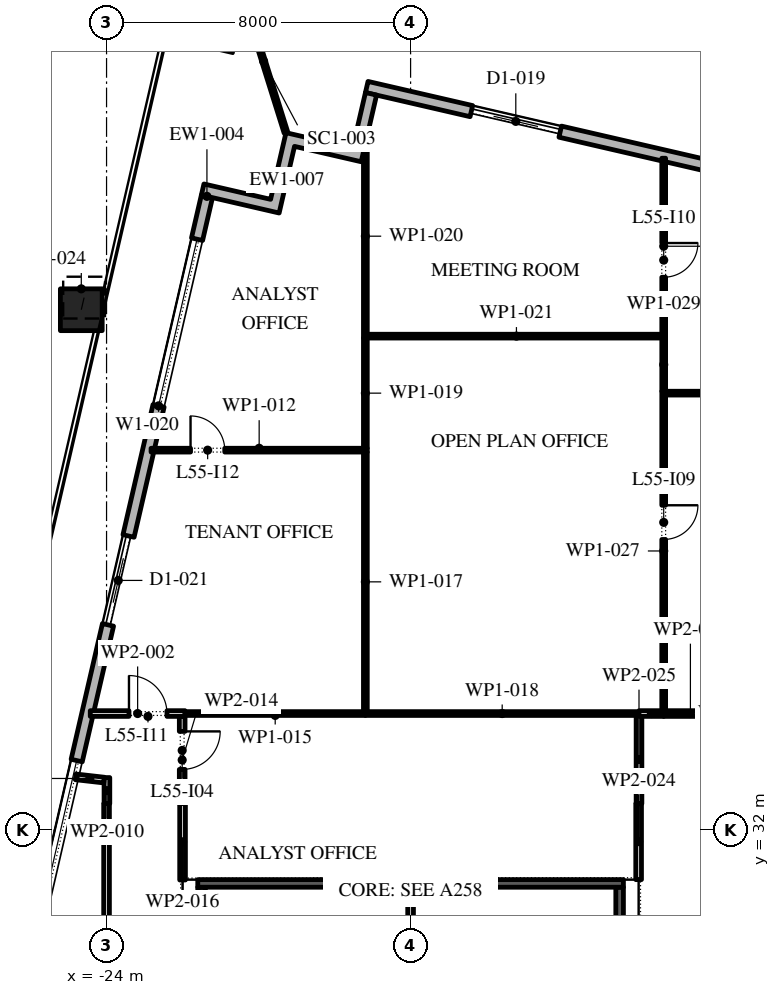
"""IFC4 building model, lengths in metres.
Left out: names, types, materials, properties, quantities, classifications, styles, units other than length and angle.
Written with IfcOpenShell. Run it as: python <this file> out.ifc"""

import sys

from ifc_helpers import new_model, si_unit, direction, frame, frame_2d, origin, origin_2d, place, context, subcontext, project, spatial, polyline, rectangle, outline, extrude, element, fill, save


model = new_model("IFC4")
c1 = context("Model", 3, precision=1e-05, world=origin(), true_north=direction((0.0, 1.0)))
c2 = subcontext(c1, "Body", "Model", "MODEL_VIEW")
j1 = project(units=[si_unit("LENGTHUNIT", "METRE"), si_unit("PLANEANGLEUNIT", "RADIAN")], contexts=[c1])
p1 = place(None, origin())
s1 = spatial("IfcSite", under=j1, at=p1, CompositionType="ELEMENT")
p2 = place(p1, origin())
s2 = spatial("IfcBuilding", under=s1, at=p2, CompositionType="ELEMENT")
p3 = place(p2, frame((0.0, 0.0, 255.6)))
s3 = spatial("IfcBuildingStorey", under=s2, at=p3, CompositionType="ELEMENT", Elevation=255.6)
p4 = place(p3, frame((-24.665, 45.695, 0.0), z_axis=(0.017501948819, 0.075745189095, 0.996973594493), x_axis=(-0.974328337224, 0.225131719848, 0.0)))
e1 = element("IfcColumn", 1, at=p4, inside=s3, PredefinedType="COLUMN", context=c2, shape_type="SweptSolid", body=[
    extrude(rectangle(XDim=1.1, YDim=1.1, at=origin_2d()), origin(), (0.0, 0.0, 1.0), 4.213),
])
p5 = place(p3, frame((29.616, 40.758, 0.0), z_axis=(0.0, 0.0, 1.0), x_axis=(-0.974370532314, 0.224949029246, 0.0)))
e2 = element("IfcWall", 2, at=p5, inside=s3, PredefinedType="STANDARD", context=c2, shape_type="SweptSolid", body=[
    extrude(rectangle(XDim=48.0, YDim=0.3, at=frame_2d((24.0, 0.0))), origin(), (0.0, 0.0, 1.0), 4.0),
])
p6 = place(p5, frame((1.625, 0.0, 0.45)))
e3 = element("IfcOpeningElement", 3, at=p6, cuts=e2, PredefinedType="OPENING", context=c2, shape_type="SweptSolid", body=[
    extrude(rectangle(XDim=4.5, YDim=2.675, at=frame_2d((2.25, 1.337))), frame((0.0, 0.16, 0.0), z_axis=(0.0, -1.0, 0.0), x_axis=(1.0, 0.0, 0.0)), (0.0, 0.0, 1.0), 0.32),
])
p7 = place(p5, frame((10.575, 0.0, 0.0)))
e4 = element("IfcOpeningElement", 4, at=p7, cuts=e2, PredefinedType="OPENING", context=c2, shape_type="SweptSolid", body=[
    extrude(rectangle(XDim=2.4, YDim=3.5, at=frame_2d((1.2, 1.75))), frame((0.0, 0.16, 0.0), z_axis=(0.0, -1.0, 0.0), x_axis=(1.0, 0.0, 0.0)), (0.0, 0.0, 1.0), 0.32),
])
p8 = place(p5, frame((17.575, 0.0, 0.45)))
e5 = element("IfcOpeningElement", 5, at=p8, cuts=e2, PredefinedType="OPENING", context=c2, shape_type="SweptSolid", body=[
    extrude(rectangle(XDim=4.5, YDim=2.525, at=frame_2d((2.25, 1.262))), frame((0.0, 0.16, 0.0), z_axis=(0.0, -1.0, 0.0), x_axis=(1.0, 0.0, 0.0)), (0.0, 0.0, 1.0), 0.32),
])
p9 = place(p5, frame((25.625, 0.0, 0.45)))
e6 = element("IfcOpeningElement", 6, at=p9, cuts=e2, PredefinedType="OPENING", context=c2, shape_type="SweptSolid", body=[
    extrude(rectangle(XDim=4.5, YDim=2.45, at=frame_2d((2.25, 1.225))), frame((0.0, 0.16, 0.0), z_axis=(0.0, -1.0, 0.0), x_axis=(1.0, 0.0, 0.0)), (0.0, 0.0, 1.0), 0.32),
])
p10 = place(p5, frame((33.675, 0.0, 0.45)))
e7 = element("IfcOpeningElement", 7, at=p10, cuts=e2, PredefinedType="OPENING", context=c2, shape_type="SweptSolid", body=[
    extrude(rectangle(XDim=4.5, YDim=2.45, at=frame_2d((2.25, 1.225))), frame((0.0, 0.16, 0.0), z_axis=(0.0, -1.0, 0.0), x_axis=(1.0, 0.0, 0.0)), (0.0, 0.0, 1.0), 0.32),
])
p11 = place(p5, frame((42.775, 0.0, 0.0)))
e8 = element("IfcOpeningElement", 8, at=p11, cuts=e2, PredefinedType="OPENING", context=c2, shape_type="SweptSolid", body=[
    extrude(rectangle(XDim=2.4, YDim=3.5, at=frame_2d((1.2, 1.75))), frame((0.0, 0.16, 0.0), z_axis=(0.0, -1.0, 0.0), x_axis=(1.0, 0.0, 0.0)), (0.0, 0.0, 1.0), 0.32),
])
p12 = place(p3, frame((-21.359, 48.678, 0.0), z_axis=(0.0, 0.0, 1.0), x_axis=(-0.224949198343, -0.974370493275, 0.0)))
e9 = element("IfcWall", 9, at=p12, inside=s3, PredefinedType="STANDARD", context=c2, shape_type="SweptSolid", body=[
    extrude(rectangle(XDim=49.5, YDim=0.3, at=frame_2d((24.75, 0.0))), origin(), (0.0, 0.0, 1.0), 4.0),
])
p13 = place(p12, frame((1.157, 0.0, 0.45)))
e10 = element("IfcOpeningElement", 10, at=p13, cuts=e9, PredefinedType="OPENING", context=c2, shape_type="SweptSolid", body=[
    extrude(rectangle(XDim=4.5, YDim=3.05, at=frame_2d((2.25, 1.525))), frame((0.0, 0.16, 0.0), z_axis=(0.0, -1.0, 0.0), x_axis=(1.0, 0.0, 0.0)), (0.0, 0.0, 1.0), 0.32),
])
p14 = place(p12, frame((9.171, 0.0, 0.0)))
e11 = element("IfcOpeningElement", 11, at=p14, cuts=e9, PredefinedType="OPENING", context=c2, shape_type="SweptSolid", body=[
    extrude(rectangle(XDim=2.4, YDim=3.5, at=frame_2d((1.2, 1.75))), frame((0.0, 0.16, 0.0), z_axis=(0.0, -1.0, 0.0), x_axis=(1.0, 0.0, 0.0)), (0.0, 0.0, 1.0), 0.32),
])
p15 = place(p12, frame((15.236, 0.0, 0.45)))
e12 = element("IfcOpeningElement", 12, at=p15, cuts=e9, PredefinedType="OPENING", context=c2, shape_type="SweptSolid", body=[
    extrude(rectangle(XDim=4.5, YDim=3.05, at=frame_2d((2.25, 1.525))), frame((0.0, 0.16, 0.0), z_axis=(0.0, -1.0, 0.0), x_axis=(1.0, 0.0, 0.0)), (0.0, 0.0, 1.0), 0.32),
])
p16 = place(p12, frame((22.35, 0.0, 0.45)))
e13 = element("IfcOpeningElement", 13, at=p16, cuts=e9, PredefinedType="OPENING", context=c2, shape_type="SweptSolid", body=[
    extrude(rectangle(XDim=4.5, YDim=3.05, at=frame_2d((2.25, 1.525))), frame((0.0, 0.16, 0.0), z_axis=(0.0, -1.0, 0.0), x_axis=(1.0, 0.0, 0.0)), (0.0, 0.0, 1.0), 0.32),
])
p17 = place(p12, frame((29.464, 0.0, 0.45)))
e14 = element("IfcOpeningElement", 14, at=p17, cuts=e9, PredefinedType="OPENING", context=c2, shape_type="SweptSolid", body=[
    extrude(rectangle(XDim=4.5, YDim=3.05, at=frame_2d((2.25, 1.525))), frame((0.0, 0.16, 0.0), z_axis=(0.0, -1.0, 0.0), x_axis=(1.0, 0.0, 0.0)), (0.0, 0.0, 1.0), 0.32),
])
p18 = place(p12, frame((37.628, 0.0, 0.0)))
e15 = element("IfcOpeningElement", 15, at=p18, cuts=e9, PredefinedType="OPENING", context=c2, shape_type="SweptSolid", body=[
    extrude(rectangle(XDim=2.4, YDim=3.325, at=frame_2d((1.2, 1.663))), frame((0.0, 0.16, 0.0), z_axis=(0.0, -1.0, 0.0), x_axis=(1.0, 0.0, 0.0)), (0.0, 0.0, 1.0), 0.32),
])
p19 = place(p12, frame((43.693, 0.0, 0.45)))
e16 = element("IfcOpeningElement", 16, at=p19, cuts=e9, PredefinedType="OPENING", context=c2, shape_type="SweptSolid", body=[
    extrude(rectangle(XDim=4.5, YDim=2.825, at=frame_2d((2.25, 1.413))), frame((0.0, 0.16, 0.0), z_axis=(0.0, -1.0, 0.0), x_axis=(1.0, 0.0, 0.0)), (0.0, 0.0, 1.0), 0.32),
])
p20 = place(p3, origin())
e17 = element("IfcWall", 17, at=p20, inside=s3, PredefinedType="STANDARD", context=c2, shape_type="SweptSolid", body=[
    extrude(outline(polyline([(-21.505, 48.712), (-21.438, 49.004), (-19.684, 48.599), (-19.279, 50.353), (-17.525, 49.948), (-17.188, 51.41), (-16.895, 51.342), (-17.3, 49.588), (-19.054, 49.993), (-19.459, 48.24), (-21.505, 48.712)])), origin(), (0.0, 0.0, 1.0), 4.0),
])
p21 = place(p3, frame((-19.279, 50.353, -0.05), z_axis=(0.0, 0.0, 1.0), x_axis=(-0.299021910401, 0.954246245526, 0.0)))
e18 = element("IfcWall", 18, at=p21, inside=s3, PredefinedType="STANDARD", context=c2, shape_type="SweptSolid", body=[
    extrude(rectangle(XDim=3.945, YDim=0.1, at=frame_2d((1.973, 0.0))), origin(), (0.0, 0.0, 1.0), 4.05),
])
p22 = place(p3, frame((-21.5, 25.75, 0.0), z_axis=(0.0, 0.0, 1.0), x_axis=(0.0, 1.0, 0.0)))
e19 = element("IfcWall", 19, at=p22, inside=s3, PredefinedType="SHEAR", context=c2, shape_type="SweptSolid", body=[
    extrude(rectangle(XDim=4.75, YDim=0.2, at=frame_2d((2.375, 0.0))), origin(), (0.0, 0.0, 1.0), 4.0),
])
p23 = place(p22, frame((1.925, 0.0, 0.0)))
e20 = element("IfcOpeningElement", 20, at=p23, cuts=e19, PredefinedType="OPENING", context=c2, shape_type="SweptSolid", body=[
    extrude(rectangle(XDim=0.9, YDim=2.1, at=frame_2d((0.45, 1.05))), frame((0.0, 0.11, 0.0), z_axis=(0.0, -1.0, 0.0), x_axis=(1.0, 0.0, 0.0)), (0.0, 0.0, 1.0), 0.22),
])
p24 = place(p3, frame((-10.5, 25.75, 0.0), z_axis=(0.0, 0.0, 1.0), x_axis=(0.0, 1.0, 0.0)))
e21 = element("IfcWall", 21, at=p24, inside=s3, PredefinedType="SHEAR", context=c2, shape_type="SweptSolid", body=[
    extrude(rectangle(XDim=4.75, YDim=0.2, at=frame_2d((2.375, 0.0))), origin(), (0.0, 0.0, 1.0), 4.0),
])
p25 = place(p24, frame((1.925, 0.0, 0.0)))
e22 = element("IfcOpeningElement", 22, at=p25, cuts=e21, PredefinedType="OPENING", context=c2, shape_type="SweptSolid", body=[
    extrude(rectangle(XDim=0.9, YDim=2.1, at=frame_2d((0.45, 1.05))), frame((0.0, 0.11, 0.0), z_axis=(0.0, -1.0, 0.0), x_axis=(1.0, 0.0, 0.0)), (0.0, 0.0, 1.0), 0.22),
])
p26 = place(p3, frame((-21.6, 30.6, 0.0), z_axis=(0.0, 0.0, 1.0), x_axis=(1.0, 0.0, 0.0)))
e23 = element("IfcWall", 23, at=p26, inside=s3, PredefinedType="SHEAR", context=c2, shape_type="SweptSolid", body=[
    extrude(rectangle(XDim=11.2, YDim=0.2, at=frame_2d((5.6, 0.0))), origin(), (0.0, 0.0, 1.0), 4.0),
])
p27 = place(p3, frame((-16.0, 25.75, 0.0), z_axis=(0.0, 0.0, 1.0), x_axis=(0.0, 1.0, 0.0)))
e24 = element("IfcWall", 24, at=p27, inside=s3, PredefinedType="PARTITIONING", context=c2, shape_type="SweptSolid", body=[
    extrude(rectangle(XDim=4.75, YDim=0.15, at=frame_2d((2.375, 0.0))), origin(), (0.0, 0.0, 1.0), 4.0),
])
p28 = place(p3, frame((-24.429, 35.07, 0.0), z_axis=(0.0, 0.0, 1.0), x_axis=(1.0, 0.0, 0.0)))
e25 = element("IfcWall", 25, at=p28, inside=s3, PredefinedType="PARTITIONING", context=c2, shape_type="SweptSolid", body=[
    extrude(rectangle(XDim=2.494, YDim=0.15, at=frame_2d((1.247, 0.0))), origin(), (0.0, 0.0, 1.0), 4.0),
])
p29 = place(p28, frame((1.019, 0.0, 0.0)))
e26 = element("IfcOpeningElement", 26, at=p29, cuts=e25, PredefinedType="OPENING", context=c2, shape_type="SweptSolid", body=[
    extrude(rectangle(XDim=1.0, YDim=2.1, at=frame_2d((0.5, 1.05))), frame((0.0, 0.085, 0.0), z_axis=(0.0, -1.0, 0.0), x_axis=(1.0, 0.0, 0.0)), (0.0, 0.0, 1.0), 0.17),
])
p30 = place(p3, frame((-24.0, 22.77, 0.0), z_axis=(0.0, 0.0, 1.0), x_axis=(0.0, 1.0, 0.0)))
e27 = element("IfcWall", 27, at=p30, inside=s3, PredefinedType="PARTITIONING", context=c2, shape_type="SweptSolid", body=[
    extrude(rectangle(XDim=9.93, YDim=0.15, at=frame_2d((4.965, 0.0))), origin(), (0.0, 0.0, 1.0), 4.0),
])
p31 = place(p30, frame((4.53, 0.0, 0.0)))
e28 = element("IfcOpeningElement", 28, at=p31, cuts=e27, PredefinedType="OPENING", context=c2, shape_type="SweptSolid", body=[
    extrude(rectangle(XDim=1.0, YDim=2.1, at=frame_2d((0.5, 1.05))), frame((0.0, 0.085, 0.0), z_axis=(0.0, -1.0, 0.0), x_axis=(1.0, 0.0, 0.0)), (0.0, 0.0, 1.0), 0.17),
])
p32 = place(p3, frame((-23.99, 32.7, 0.0), z_axis=(0.0, 0.0, 1.0), x_axis=(0.0, 1.0, 0.0)))
e29 = element("IfcWall", 29, at=p32, inside=s3, PredefinedType="PARTITIONING", context=c2, shape_type="SweptSolid", body=[
    extrude(rectangle(XDim=0.685, YDim=0.15, at=frame_2d((0.343, 0.0))), origin(), (0.0, 0.0, 1.0), 4.0),
])
p33 = place(p3, frame((-24.065, 33.319, 0.0), z_axis=(0.0, 0.0, 1.0), x_axis=(-0.993611867789, 0.112851478456, 0.0)))
e30 = element("IfcWall", 30, at=p33, inside=s3, PredefinedType="PARTITIONING", context=c2, shape_type="SweptSolid", body=[
    extrude(rectangle(XDim=0.753, YDim=0.15, at=frame_2d((0.376, 0.0))), origin(), (0.0, 0.0, 1.0), 4.0),
])
p34 = place(p3, frame((-22.829, 42.0, 0.0), z_axis=(0.0, 0.0, 1.0), x_axis=(1.0, 0.0, 0.0)))
e31 = element("IfcWall", 31, at=p34, inside=s3, PredefinedType="PARTITIONING", context=c2, shape_type="SweptSolid", body=[
    extrude(rectangle(XDim=5.689, YDim=0.1, at=frame_2d((2.845, 0.0))), origin(), (0.0, 0.0, 1.0), 4.0),
])
p35 = place(p34, frame((1.039, 0.0, 0.0)))
e32 = element("IfcOpeningElement", 32, at=p35, cuts=e31, PredefinedType="OPENING", context=c2, shape_type="SweptSolid", body=[
    extrude(rectangle(XDim=0.9, YDim=2.1, at=frame_2d((0.45, 1.05))), frame((0.0, 0.06, 0.0), z_axis=(0.0, -1.0, 0.0), x_axis=(1.0, 0.0, 0.0)), (0.0, 0.0, 1.0), 0.12),
])
p36 = place(p3, frame((-22.01, 34.995, 0.0), z_axis=(0.0, 0.0, 1.0), x_axis=(0.0, -1.0, 0.0)))
e33 = element("IfcWall", 33, at=p36, inside=s3, PredefinedType="PARTITIONING", context=c2, shape_type="SweptSolid", body=[
    extrude(rectangle(XDim=2.295, YDim=0.15, at=frame_2d((1.147, 0.0))), origin(), (0.0, 0.0, 1.0), 4.0),
])
p37 = place(p36, frame((0.395, 0.0, 0.0)))
e34 = element("IfcOpeningElement", 34, at=p37, cuts=e33, PredefinedType="OPENING", context=c2, shape_type="SweptSolid", body=[
    extrude(rectangle(XDim=1.0, YDim=2.1, at=frame_2d((0.5, 1.05))), frame((0.0, 0.085, 0.0), z_axis=(0.0, -1.0, 0.0), x_axis=(1.0, 0.0, 0.0)), (0.0, 0.0, 1.0), 0.17),
])
p38 = place(p3, frame((-21.935, 35.07, 0.0), z_axis=(0.0, 0.0, 1.0), x_axis=(1.0, 0.0, 0.0)))
e35 = element("IfcWall", 35, at=p38, inside=s3, PredefinedType="PARTITIONING", context=c2, shape_type="SweptSolid", body=[
    extrude(rectangle(XDim=4.745, YDim=0.1, at=frame_2d((2.373, 0.0))), origin(), (0.0, 0.0, 1.0), 4.0),
])
p39 = place(p3, frame((-22.0, 32.7, 0.0), z_axis=(0.0, 0.0, 1.0), x_axis=(0.0, -1.0, 0.0)))
e36 = element("IfcWall", 36, at=p39, inside=s3, PredefinedType="PARTITIONING", context=c2, shape_type="SweptSolid", body=[
    extrude(rectangle(XDim=2.01, YDim=0.15, at=frame_2d((1.005, 0.0))), origin(), (0.0, 0.0, 1.0), 4.0),
])
p40 = place(p3, frame((-17.19, 35.12, 0.0), z_axis=(0.0, 0.0, 1.0), x_axis=(0.0, 1.0, 0.0)))
e37 = element("IfcWall", 37, at=p40, inside=s3, PredefinedType="PARTITIONING", context=c2, shape_type="SweptSolid", body=[
    extrude(rectangle(XDim=6.83, YDim=0.1, at=frame_2d((3.415, 0.0))), origin(), (0.0, 0.0, 1.0), 4.0),
])
p41 = place(p3, frame((-17.19, 35.07, 0.0), z_axis=(0.0, 0.0, 1.0), x_axis=(1.0, 0.0, 0.0)))
e38 = element("IfcWall", 38, at=p41, inside=s3, PredefinedType="PARTITIONING", context=c2, shape_type="SweptSolid", body=[
    extrude(rectangle(XDim=7.2, YDim=0.1, at=frame_2d((3.6, 0.0))), origin(), (0.0, 0.0, 1.0), 4.0),
])
p42 = place(p3, frame((-17.19, 42.05, 0.0), z_axis=(0.0, 0.0, 1.0), x_axis=(0.0, 1.0, 0.0)))
e39 = element("IfcWall", 39, at=p42, inside=s3, PredefinedType="PARTITIONING", context=c2, shape_type="SweptSolid", body=[
    extrude(rectangle(XDim=2.9, YDim=0.1, at=frame_2d((1.45, 0.0))), origin(), (0.0, 0.0, 1.0), 4.0),
])
p43 = place(p3, frame((-17.19, 44.95, 0.0), z_axis=(0.0, 0.0, 1.0), x_axis=(0.0, 1.0, 0.0)))
e40 = element("IfcWall", 40, at=p43, inside=s3, PredefinedType="PARTITIONING", context=c2, shape_type="SweptSolid", body=[
    extrude(rectangle(XDim=5.36, YDim=0.1, at=frame_2d((2.68, 0.0))), origin(), (0.0, 0.0, 1.0), 4.0),
])
p44 = place(p3, frame((-17.14, 45.0, 0.0), z_axis=(0.0, 0.0, 1.0), x_axis=(1.0, 0.0, 0.0)))
e41 = element("IfcWall", 41, at=p44, inside=s3, PredefinedType="PARTITIONING", context=c2, shape_type="SweptSolid", body=[
    extrude(rectangle(XDim=7.85, YDim=0.1, at=frame_2d((3.925, 0.0))), origin(), (0.0, 0.0, 1.0), 4.0),
])
p45 = place(p3, frame((-10.0, 30.7, 0.0), z_axis=(0.0, 0.0, 1.0), x_axis=(0.0, 1.0, 0.0)))
e42 = element("IfcWall", 42, at=p45, inside=s3, PredefinedType="PARTITIONING", context=c2, shape_type="SweptSolid", body=[
    extrude(rectangle(XDim=2.0, YDim=0.15, at=frame_2d((1.0, 0.0))), origin(), (0.0, 0.0, 1.0), 4.0),
])
p46 = place(p3, frame((-9.99, 32.7, 0.0), z_axis=(0.0, 0.0, 1.0), x_axis=(0.0, 1.0, 0.0)))
e43 = element("IfcWall", 43, at=p46, inside=s3, PredefinedType="PARTITIONING", context=c2, shape_type="SweptSolid", body=[
    extrude(rectangle(XDim=2.32, YDim=0.15, at=frame_2d((1.16, 0.0))), origin(), (0.0, 0.0, 1.0), 4.0),
])
p47 = place(p3, frame((-9.99, 35.07, 0.0), z_axis=(0.0, 0.0, 1.0), x_axis=(1.0, 0.0, 0.0)))
e44 = element("IfcWall", 44, at=p47, inside=s3, PredefinedType="PARTITIONING", context=c2, shape_type="SweptSolid", body=[
    extrude(rectangle(XDim=0.65, YDim=0.15, at=frame_2d((0.325, 0.0))), origin(), (0.0, 0.0, 1.0), 4.0),
])
p48 = place(p3, frame((-9.34, 35.145, 0.0), z_axis=(0.0, 0.0, 1.0), x_axis=(0.0, 1.0, 0.0)))
e45 = element("IfcWall", 45, at=p48, inside=s3, PredefinedType="PARTITIONING", context=c2, shape_type="SweptSolid", body=[
    extrude(rectangle(XDim=8.405, YDim=0.1, at=frame_2d((4.203, 0.0))), origin(), (0.0, 0.0, 1.0), 4.0),
])
p49 = place(p48, frame((4.505, 0.0, 0.0)))
e46 = element("IfcOpeningElement", 46, at=p49, cuts=e45, PredefinedType="OPENING", context=c2, shape_type="SweptSolid", body=[
    extrude(rectangle(XDim=0.9, YDim=2.1, at=frame_2d((0.45, 1.05))), frame((0.0, 0.06, 0.0), z_axis=(0.0, -1.0, 0.0), x_axis=(1.0, 0.0, 0.0)), (0.0, 0.0, 1.0), 0.12),
])
p50 = place(p3, frame((-9.34, 35.07, 0.0), z_axis=(0.0, 0.0, 1.0), x_axis=(1.0, 0.0, 0.0)))
e47 = element("IfcWall", 47, at=p50, inside=s3, PredefinedType="PARTITIONING", context=c2, shape_type="SweptSolid", body=[
    extrude(rectangle(XDim=1.405, YDim=0.15, at=frame_2d((0.703, 0.0))), origin(), (0.0, 0.0, 1.0), 4.0),
])
p51 = place(p3, frame((-9.34, 43.55, 0.0), z_axis=(0.0, 0.0, 1.0), x_axis=(0.0, 1.0, 0.0)))
e48 = element("IfcWall", 48, at=p51, inside=s3, PredefinedType="PARTITIONING", context=c2, shape_type="SweptSolid", body=[
    extrude(rectangle(XDim=1.4, YDim=0.1, at=frame_2d((0.7, 0.0))), origin(), (0.0, 0.0, 1.0), 4.0),
])
p52 = place(p3, frame((-9.29, 43.5, 0.0), z_axis=(0.0, 0.0, 1.0), x_axis=(1.0, 0.0, 0.0)))
e49 = element("IfcWall", 49, at=p52, inside=s3, PredefinedType="PARTITIONING", context=c2, shape_type="SweptSolid", body=[
    extrude(rectangle(XDim=8.265, YDim=0.1, at=frame_2d((4.133, 0.0))), origin(), (0.0, 0.0, 1.0), 4.0),
])
p53 = place(p3, frame((-9.34, 45.05, 0.0), z_axis=(0.0, 0.0, 1.0), x_axis=(0.0, 1.0, 0.0)))
e50 = element("IfcWall", 50, at=p53, inside=s3, PredefinedType="PARTITIONING", context=c2, shape_type="SweptSolid", body=[
    extrude(rectangle(XDim=4.631, YDim=0.1, at=frame_2d((2.315, 0.0))), origin(), (0.0, 0.0, 1.0), 4.0),
])
p54 = place(p53, frame((1.5, 0.0, 0.0)))
e51 = element("IfcOpeningElement", 51, at=p54, cuts=e50, PredefinedType="OPENING", context=c2, shape_type="SweptSolid", body=[
    extrude(rectangle(XDim=0.9, YDim=2.1, at=frame_2d((0.45, 1.05))), frame((0.0, 0.06, 0.0), z_axis=(0.0, -1.0, 0.0), x_axis=(1.0, 0.0, 0.0)), (0.0, 0.0, 1.0), 0.12),
])
p55 = place(p11, origin())
e52 = element("IfcDoor", 52, at=p55, inside=s3, OperationType="DOUBLE_DOOR_SLIDING", PredefinedType="DOOR", context=c2, shape_type="SweptSolid", body=[
    extrude(rectangle(XDim=2.4, YDim=3.5, at=frame_2d((1.2, 1.75))), frame((0.0, 0.025, 0.0), z_axis=(0.0, -1.0, 0.0), x_axis=(1.0, 0.0, 0.0)), (0.0, 0.0, 1.0), 0.05),
])
fill(e8, e52)
p56 = place(p13, origin())
e53 = element("IfcWindow", 53, at=p56, inside=s3, PartitioningType="DOUBLE_PANEL_VERTICAL", PredefinedType="WINDOW", context=c2, shape_type="SweptSolid", body=[
    extrude(rectangle(XDim=4.5, YDim=3.05, at=frame_2d((2.25, 1.525))), frame((0.0, 0.03, 0.0), z_axis=(0.0, -1.0, 0.0), x_axis=(1.0, 0.0, 0.0)), (0.0, 0.0, 1.0), 0.06),
])
fill(e10, e53)
p57 = place(p14, origin())
e54 = element("IfcDoor", 54, at=p57, inside=s3, OperationType="DOUBLE_DOOR_SLIDING", PredefinedType="DOOR", context=c2, shape_type="SweptSolid", body=[
    extrude(rectangle(XDim=2.4, YDim=3.5, at=frame_2d((1.2, 1.75))), frame((0.0, 0.025, 0.0), z_axis=(0.0, -1.0, 0.0), x_axis=(1.0, 0.0, 0.0)), (0.0, 0.0, 1.0), 0.05),
])
fill(e11, e54)
p58 = place(p15, origin())
e55 = element("IfcWindow", 55, at=p58, inside=s3, PartitioningType="DOUBLE_PANEL_VERTICAL", PredefinedType="WINDOW", context=c2, shape_type="SweptSolid", body=[
    extrude(rectangle(XDim=4.5, YDim=3.05, at=frame_2d((2.25, 1.525))), frame((0.0, 0.03, 0.0), z_axis=(0.0, -1.0, 0.0), x_axis=(1.0, 0.0, 0.0)), (0.0, 0.0, 1.0), 0.06),
])
fill(e12, e55)
p59 = place(p37, origin())
e56 = element("IfcDoor", 56, at=p59, inside=s3, OperationType="SINGLE_SWING_RIGHT", PredefinedType="DOOR", context=c2, shape_type="SweptSolid", body=[
    extrude(rectangle(XDim=1.0, YDim=2.1, at=frame_2d((0.5, 1.05))), frame((0.0, 0.025, 0.0), z_axis=(0.0, -1.0, 0.0), x_axis=(1.0, 0.0, 0.0)), (0.0, 0.0, 1.0), 0.05),
])
fill(e34, e56)
p60 = place(p49, frame((0.9, 0.0, 0.0), z_axis=(0.0, 0.0, 1.0), x_axis=(-1.0, 0.0, 0.0)))
e57 = element("IfcDoor", 57, at=p60, inside=s3, OperationType="SINGLE_SWING_RIGHT", PredefinedType="DOOR", context=c2, shape_type="SweptSolid", body=[
    extrude(rectangle(XDim=0.9, YDim=2.1, at=frame_2d((0.45, 1.05))), frame((0.0, 0.025, 0.0), z_axis=(0.0, -1.0, 0.0), x_axis=(1.0, 0.0, 0.0)), (0.0, 0.0, 1.0), 0.05),
])
fill(e46, e57)
p61 = place(p54, frame((0.9, 0.0, 0.0), z_axis=(0.0, 0.0, 1.0), x_axis=(-1.0, 0.0, 0.0)))
e58 = element("IfcDoor", 58, at=p61, inside=s3, OperationType="SINGLE_SWING_RIGHT", PredefinedType="DOOR", context=c2, shape_type="SweptSolid", body=[
    extrude(rectangle(XDim=0.9, YDim=2.1, at=frame_2d((0.45, 1.05))), frame((0.0, 0.025, 0.0), z_axis=(0.0, -1.0, 0.0), x_axis=(1.0, 0.0, 0.0)), (0.0, 0.0, 1.0), 0.05),
])
fill(e51, e58)
p62 = place(p29, origin())
e59 = element("IfcDoor", 59, at=p62, inside=s3, OperationType="SINGLE_SWING_RIGHT", PredefinedType="DOOR", context=c2, shape_type="SweptSolid", body=[
    extrude(rectangle(XDim=1.0, YDim=2.1, at=frame_2d((0.5, 1.05))), frame((0.0, 0.025, 0.0), z_axis=(0.0, -1.0, 0.0), x_axis=(1.0, 0.0, 0.0)), (0.0, 0.0, 1.0), 0.05),
])
fill(e26, e59)
p63 = place(p35, origin())
e60 = element("IfcDoor", 60, at=p63, inside=s3, OperationType="SINGLE_SWING_RIGHT", PredefinedType="DOOR", context=c2, shape_type="SweptSolid", body=[
    extrude(rectangle(XDim=0.9, YDim=2.1, at=frame_2d((0.45, 1.05))), frame((0.0, 0.025, 0.0), z_axis=(0.0, -1.0, 0.0), x_axis=(1.0, 0.0, 0.0)), (0.0, 0.0, 1.0), 0.05),
])
fill(e32, e60)
save(model, sys.argv[1])
